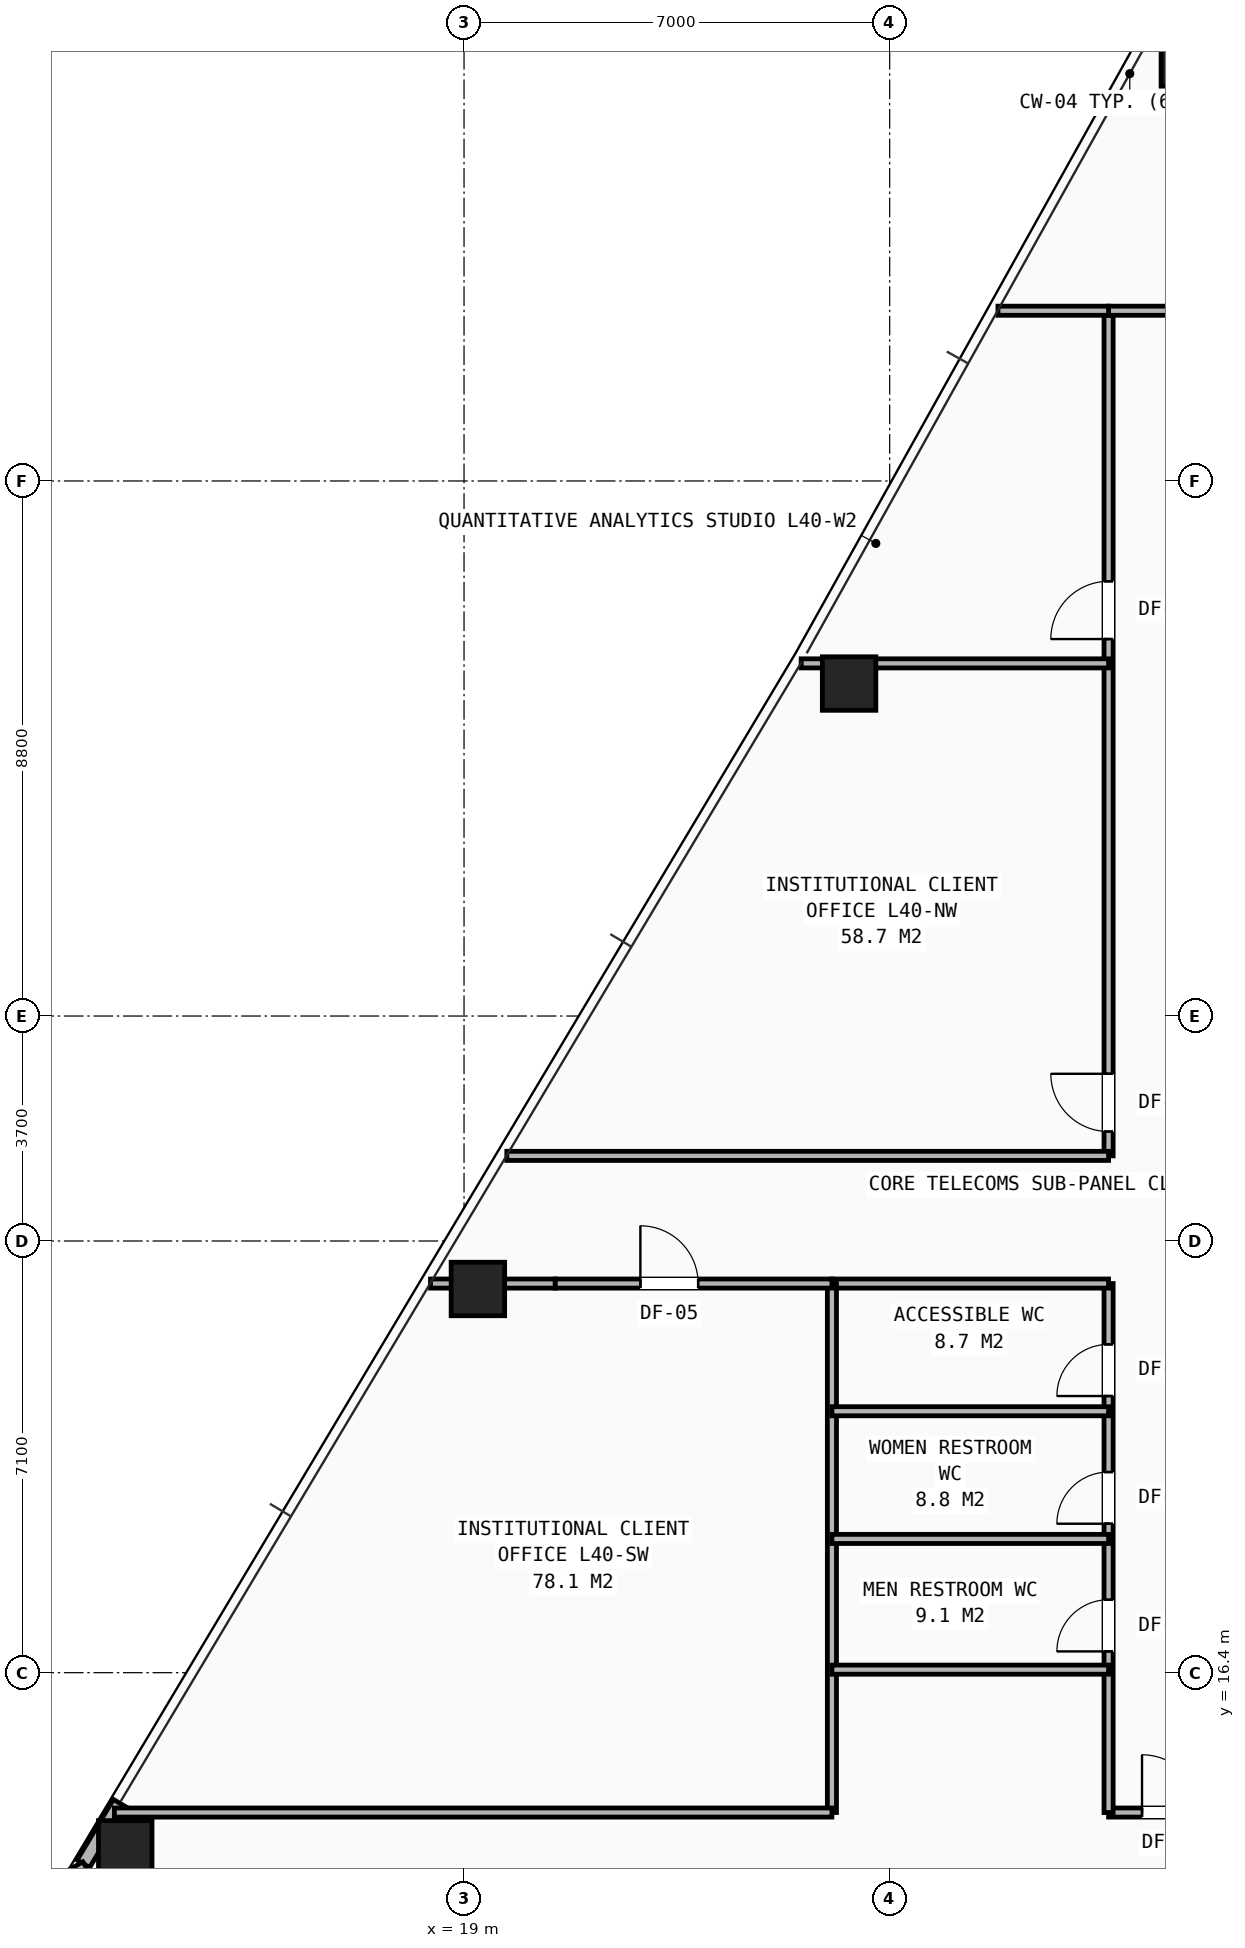
"""IFC4 building model, lengths in metres.
Left out: names, types, materials, properties, quantities, classifications, styles, units other than length and angle.
Written with IfcOpenShell. Run it as: python <this file> out.ifc"""

import sys

from ifc_helpers import new_model, si_unit, direction, frame, frame_2d, origin, origin_2d, place, context, subcontext, project, spatial, rectangle, hollow_rectangle, extrude, element, fill, save


model = new_model("IFC4")
c1 = context("Model", 3, precision=1e-05, world=origin(), true_north=direction((0.0, 1.0)))
c2 = subcontext(c1, "Body", "Model", "MODEL_VIEW")
j1 = project(units=[si_unit("LENGTHUNIT", "METRE"), si_unit("PLANEANGLEUNIT", "RADIAN")], contexts=[c1])
p1 = place(None, origin())
s1 = spatial("IfcSite", under=j1, at=p1, CompositionType="ELEMENT")
p2 = place(p1, origin())
s2 = spatial("IfcBuilding", under=s1, at=p2, CompositionType="ELEMENT")
p3 = place(p2, frame((0.0, 0.0, 140.15)))
s3 = spatial("IfcBuildingStorey", under=s2, at=p3, CompositionType="ELEMENT", Elevation=140.15)
for number, where, z_axis, x_axis in (
    (1, (30.904, 42.934, 0.0), (0.0, 0.0, 1.0), (1.0, 0.0, 0.0)),
    (2, (25.333, 32.668, 0.0), (0.0, 0.0, 1.0), (1.0, 0.0, 0.0)),
    (3, (19.228, 22.711, 0.0), (0.0, 0.0, 1.0), (1.0, 0.0, 0.0)),
    (4, (13.428, 13.527, 0.0), (0.0, 0.0, 1.0), (1.0, 0.0, 0.0)),
):
    element("IfcColumn", number, at=place(p3, frame(where, z_axis=z_axis, x_axis=x_axis)), inside=s3, PredefinedType="COLUMN", context=c2, shape_type="SweptSolid", body=[
        extrude(hollow_rectangle(XDim=0.88, YDim=0.88, WallThickness=0.06, at=origin_2d()), origin(), (0.0, 0.0, 1.0), 3.45),
    ])
p4 = place(p3, frame((13.336, 14.254, 0.0), z_axis=(0.0, 0.0, 1.0), x_axis=(-0.512919581386, -0.858436662213, 0.0)))
e5 = element("IfcWall", 5, at=p4, inside=s3, PredefinedType="SHEAR", context=c2, shape_type="SweptSolid", body=[
    extrude(rectangle(XDim=1.162, YDim=0.24, at=frame_2d((0.581, 0.0))), origin(), (0.0, 0.0, 1.0), 2.583),
])
p5 = place(p3, frame((16.813, 5.98, 0.0), z_axis=(0.0, 0.0, 1.0), x_axis=(-0.500012768347, 0.86601803185, 0.0)))
e6 = element("IfcWall", 6, at=p5, inside=s3, PredefinedType="SHEAR", context=c2, shape_type="SweptSolid", body=[
    extrude(rectangle(XDim=8.371, YDim=0.24, at=frame_2d((4.186, 0.0))), origin(), (0.0, 0.0, 1.0), 2.583),
])
p6 = place(p3, frame((29.6, 14.1, 0.0), z_axis=(0.0, 0.0, 1.0), x_axis=(1.0, 0.0, 0.0)))
e7 = element("IfcWall", 7, at=p6, inside=s3, PredefinedType="PARTITIONING", context=c2, shape_type="SweptSolid", body=[
    extrude(rectangle(XDim=18.6, YDim=0.15, at=frame_2d((9.3, 0.0))), origin(), (0.0, 0.0, 1.0), 2.252),
])
p7 = place(p6, frame((0.55, 0.0, 0.0)))
e8 = element("IfcOpeningElement", 8, at=p7, cuts=e7, PredefinedType="OPENING", context=c2, shape_type="SweptSolid", body=[
    extrude(rectangle(XDim=0.95, YDim=2.1, at=frame_2d((0.475, 1.05))), frame((0.0, 0.085, 0.0), z_axis=(0.0, -1.0, 0.0), x_axis=(1.0, 0.0, 0.0)), (0.0, 0.0, 1.0), 0.17),
])
p8 = place(p3, frame((29.6, 14.1, 0.0), z_axis=(0.0, 0.0, 1.0), x_axis=(0.0, 1.0, 0.0)))
e9 = element("IfcWall", 9, at=p8, inside=s3, PredefinedType="PARTITIONING", context=c2, shape_type="SweptSolid", body=[
    extrude(rectangle(XDim=8.7, YDim=0.15, at=frame_2d((4.35, 0.0))), origin(), (0.0, 0.0, 1.0), 3.21),
])
p9 = place(p8, frame((2.65, 0.0, 0.0)))
e10 = element("IfcOpeningElement", 10, at=p9, cuts=e9, PredefinedType="OPENING", context=c2, shape_type="SweptSolid", body=[
    extrude(rectangle(XDim=0.85, YDim=2.05, at=frame_2d((0.425, 1.025))), frame((0.0, 0.085, 0.0), z_axis=(0.0, -1.0, 0.0), x_axis=(1.0, 0.0, 0.0)), (0.0, 0.0, 1.0), 0.17),
])
p10 = place(p8, frame((4.75, 0.0, 0.0)))
e11 = element("IfcOpeningElement", 11, at=p10, cuts=e9, PredefinedType="OPENING", context=c2, shape_type="SweptSolid", body=[
    extrude(rectangle(XDim=0.85, YDim=2.05, at=frame_2d((0.425, 1.025))), frame((0.0, 0.085, 0.0), z_axis=(0.0, -1.0, 0.0), x_axis=(1.0, 0.0, 0.0)), (0.0, 0.0, 1.0), 0.17),
])
p11 = place(p8, frame((6.85, 0.0, 0.0)))
e12 = element("IfcOpeningElement", 12, at=p11, cuts=e9, PredefinedType="OPENING", context=c2, shape_type="SweptSolid", body=[
    extrude(rectangle(XDim=0.85, YDim=2.05, at=frame_2d((0.425, 1.025))), frame((0.0, 0.085, 0.0), z_axis=(0.0, -1.0, 0.0), x_axis=(1.0, 0.0, 0.0)), (0.0, 0.0, 1.0), 0.17),
])
p12 = place(p3, frame((29.6, 24.9, 0.0), z_axis=(0.0, 0.0, 1.0), x_axis=(0.0, 1.0, 0.0)))
e13 = element("IfcWall", 13, at=p12, inside=s3, PredefinedType="PARTITIONING", context=c2, shape_type="SweptSolid", body=[
    extrude(rectangle(XDim=13.9, YDim=0.15, at=frame_2d((6.95, 0.0))), origin(), (0.0, 0.0, 1.0), 2.252),
])
p13 = place(p12, frame((0.4, 0.0, 0.0)))
e14 = element("IfcOpeningElement", 14, at=p13, cuts=e13, PredefinedType="OPENING", context=c2, shape_type="SweptSolid", body=[
    extrude(rectangle(XDim=0.95, YDim=2.1, at=frame_2d((0.475, 1.05))), frame((0.0, 0.085, 0.0), z_axis=(0.0, -1.0, 0.0), x_axis=(1.0, 0.0, 0.0)), (0.0, 0.0, 1.0), 0.17),
])
p14 = place(p12, frame((8.5, 0.0, 0.0)))
e15 = element("IfcOpeningElement", 15, at=p14, cuts=e13, PredefinedType="OPENING", context=c2, shape_type="SweptSolid", body=[
    extrude(rectangle(XDim=0.95, YDim=2.1, at=frame_2d((0.475, 1.05))), frame((0.0, 0.085, 0.0), z_axis=(0.0, -1.0, 0.0), x_axis=(1.0, 0.0, 0.0)), (0.0, 0.0, 1.0), 0.17),
])
p15 = place(p3, frame((29.6, 38.8, 0.0), z_axis=(0.0, 0.0, 1.0), x_axis=(1.0, 0.0, 0.0)))
e16 = element("IfcWall", 16, at=p15, inside=s3, PredefinedType="PARTITIONING", context=c2, shape_type="SweptSolid", body=[
    extrude(rectangle(XDim=2.2, YDim=0.15, at=frame_2d((1.1, 0.0))), origin(), (0.0, 0.0, 1.0), 2.743),
])
p16 = place(p3, frame((18.448, 22.8, 0.0), z_axis=(0.0, 0.0, 1.0), x_axis=(1.0, 0.0, 0.0)))
e17 = element("IfcWall", 17, at=p16, inside=s3, PredefinedType="PARTITIONING", context=c2, shape_type="SweptSolid", body=[
    extrude(rectangle(XDim=2.052, YDim=0.15, at=frame_2d((1.026, 0.0))), origin(), (0.0, 0.0, 1.0), 2.589),
])
p17 = place(p3, frame((25.05, 22.8, 0.0), z_axis=(0.0, 0.0, 1.0), x_axis=(1.0, 0.0, 0.0)))
e18 = element("IfcWall", 18, at=p17, inside=s3, PredefinedType="PARTITIONING", context=c2, shape_type="SweptSolid", body=[
    extrude(rectangle(XDim=4.55, YDim=0.15, at=frame_2d((2.275, 0.0))), origin(), (0.0, 0.0, 1.0), 3.21),
])
p18 = place(p3, frame((19.703, 24.9, 0.0), z_axis=(0.0, 0.0, 1.0), x_axis=(1.0, 0.0, 0.0)))
e19 = element("IfcWall", 19, at=p18, inside=s3, PredefinedType="PARTITIONING", context=c2, shape_type="SweptSolid", body=[
    extrude(rectangle(XDim=9.897, YDim=0.15, at=frame_2d((4.948, 0.0))), origin(), (0.0, 0.0, 1.0), 2.589),
])
p19 = place(p3, frame((25.05, 14.1, 0.0), z_axis=(0.0, 0.0, 1.0), x_axis=(0.0, 1.0, 0.0)))
e20 = element("IfcWall", 20, at=p19, inside=s3, PredefinedType="PARTITIONING", context=c2, shape_type="SweptSolid", body=[
    extrude(rectangle(XDim=8.7, YDim=0.15, at=frame_2d((4.35, 0.0))), origin(), (0.0, 0.0, 1.0), 3.21),
])
for number, where, z_axis, x_axis in (
    (21, (25.05, 16.45, 0.0), (0.0, 0.0, 1.0), (1.0, 0.0, 0.0)),
    (22, (25.05, 18.6, 0.0), (0.0, 0.0, 1.0), (1.0, 0.0, 0.0)),
    (23, (25.05, 20.7, 0.0), (0.0, 0.0, 1.0), (1.0, 0.0, 0.0)),
):
    element("IfcWall", number, at=place(p3, frame(where, z_axis=z_axis, x_axis=x_axis)), inside=s3, PredefinedType="PARTITIONING", context=c2, shape_type="SweptSolid", body=[
        extrude(rectangle(XDim=4.55, YDim=0.15, at=frame_2d((2.275, 0.0))), origin(), (0.0, 0.0, 1.0), 3.21),
    ])
p20 = place(p3, frame((13.249, 14.1, 0.0), z_axis=(0.0, 0.0, 1.0), x_axis=(1.0, 0.0, 0.0)))
e24 = element("IfcWall", 24, at=p20, inside=s3, PredefinedType="PARTITIONING", context=c2, shape_type="SweptSolid", body=[
    extrude(rectangle(XDim=11.801, YDim=0.15, at=frame_2d((5.9, 0.0))), origin(), (0.0, 0.0, 1.0), 2.589),
])
p21 = place(p3, frame((20.5, 22.8, 0.0), z_axis=(0.0, 0.0, 1.0), x_axis=(1.0, 0.0, 0.0)))
e25 = element("IfcWall", 25, at=p21, inside=s3, PredefinedType="PARTITIONING", context=c2, shape_type="SweptSolid", body=[
    extrude(rectangle(XDim=4.55, YDim=0.15, at=frame_2d((2.275, 0.0))), origin(), (0.0, 0.0, 1.0), 3.21),
])
p22 = place(p21, frame((1.4, 0.0, 0.0)))
e26 = element("IfcOpeningElement", 26, at=p22, cuts=e25, PredefinedType="OPENING", context=c2, shape_type="SweptSolid", body=[
    extrude(rectangle(XDim=0.95, YDim=2.1, at=frame_2d((0.475, 1.05))), frame((0.0, 0.085, 0.0), z_axis=(0.0, -1.0, 0.0), x_axis=(1.0, 0.0, 0.0)), (0.0, 0.0, 1.0), 0.17),
])
p23 = place(p3, frame((27.781, 38.8, 0.0), z_axis=(0.0, 0.0, 1.0), x_axis=(1.0, 0.0, 0.0)))
e27 = element("IfcWall", 27, at=p23, inside=s3, PredefinedType="PARTITIONING", context=c2, shape_type="SweptSolid", body=[
    extrude(rectangle(XDim=1.819, YDim=0.15, at=frame_2d((0.91, 0.0))), origin(), (0.0, 0.0, 1.0), 2.589),
])
p24 = place(p3, frame((24.544, 33.0, 0.0), z_axis=(0.0, 0.0, 1.0), x_axis=(1.0, 0.0, 0.0)))
e28 = element("IfcWall", 28, at=p24, inside=s3, PredefinedType="PARTITIONING", context=c2, shape_type="SweptSolid", body=[
    extrude(rectangle(XDim=5.056, YDim=0.15, at=frame_2d((2.528, 0.0))), origin(), (0.0, 0.0, 1.0), 2.252),
])
p25 = place(p9, origin())
e29 = element("IfcDoor", 29, at=p25, inside=s3, OperationType="SINGLE_SWING_LEFT", PredefinedType="DOOR", context=c2, shape_type="SweptSolid", body=[
    extrude(rectangle(XDim=0.85, YDim=2.05, at=frame_2d((0.425, 1.025))), frame((0.0, 0.025, 0.0), z_axis=(0.0, -1.0, 0.0), x_axis=(1.0, 0.0, 0.0)), (0.0, 0.0, 1.0), 0.05),
])
fill(e10, e29)
p26 = place(p10, origin())
e30 = element("IfcDoor", 30, at=p26, inside=s3, OperationType="SINGLE_SWING_LEFT", PredefinedType="DOOR", context=c2, shape_type="SweptSolid", body=[
    extrude(rectangle(XDim=0.85, YDim=2.05, at=frame_2d((0.425, 1.025))), frame((0.0, 0.025, 0.0), z_axis=(0.0, -1.0, 0.0), x_axis=(1.0, 0.0, 0.0)), (0.0, 0.0, 1.0), 0.05),
])
fill(e11, e30)
p27 = place(p11, origin())
e31 = element("IfcDoor", 31, at=p27, inside=s3, OperationType="SINGLE_SWING_LEFT", PredefinedType="DOOR", context=c2, shape_type="SweptSolid", body=[
    extrude(rectangle(XDim=0.85, YDim=2.05, at=frame_2d((0.425, 1.025))), frame((0.0, 0.025, 0.0), z_axis=(0.0, -1.0, 0.0), x_axis=(1.0, 0.0, 0.0)), (0.0, 0.0, 1.0), 0.05),
])
fill(e12, e31)
p28 = place(p7, origin())
e32 = element("IfcDoor", 32, at=p28, inside=s3, OperationType="SINGLE_SWING_LEFT", PredefinedType="DOOR", context=c2, shape_type="SweptSolid", body=[
    extrude(rectangle(XDim=0.95, YDim=2.1, at=frame_2d((0.475, 1.05))), frame((0.0, 0.025, 0.0), z_axis=(0.0, -1.0, 0.0), x_axis=(1.0, 0.0, 0.0)), (0.0, 0.0, 1.0), 0.05),
])
fill(e8, e32)
p29 = place(p22, origin())
e33 = element("IfcDoor", 33, at=p29, inside=s3, OperationType="SINGLE_SWING_LEFT", PredefinedType="DOOR", context=c2, shape_type="SweptSolid", body=[
    extrude(rectangle(XDim=0.95, YDim=2.1, at=frame_2d((0.475, 1.05))), frame((0.0, 0.025, 0.0), z_axis=(0.0, -1.0, 0.0), x_axis=(1.0, 0.0, 0.0)), (0.0, 0.0, 1.0), 0.05),
])
fill(e26, e33)
p30 = place(p13, origin())
e34 = element("IfcDoor", 34, at=p30, inside=s3, OperationType="SINGLE_SWING_RIGHT", PredefinedType="DOOR", context=c2, shape_type="SweptSolid", body=[
    extrude(rectangle(XDim=0.95, YDim=2.1, at=frame_2d((0.475, 1.05))), frame((0.0, 0.025, 0.0), z_axis=(0.0, -1.0, 0.0), x_axis=(1.0, 0.0, 0.0)), (0.0, 0.0, 1.0), 0.05),
])
fill(e14, e34)
p31 = place(p14, origin())
e35 = element("IfcDoor", 35, at=p31, inside=s3, OperationType="SINGLE_SWING_LEFT", PredefinedType="DOOR", context=c2, shape_type="SweptSolid", body=[
    extrude(rectangle(XDim=0.95, YDim=2.1, at=frame_2d((0.475, 1.05))), frame((0.0, 0.025, 0.0), z_axis=(0.0, -1.0, 0.0), x_axis=(1.0, 0.0, 0.0)), (0.0, 0.0, 1.0), 0.05),
])
fill(e15, e35)
save(model, sys.argv[1])
